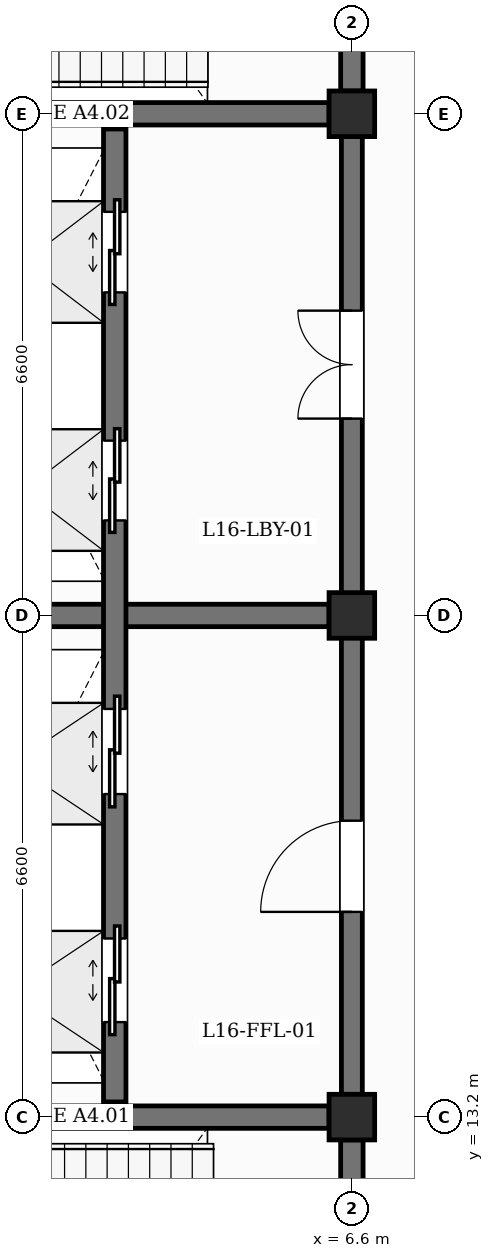
"""IFC4 building model, lengths in metres.
Left out: names, types, materials, properties, quantities, classifications, styles, units other than length and angle.
Written with IfcOpenShell. Run it as: python <this file> out.ifc"""

import sys

from ifc_helpers import new_model, si_unit, direction, frame, frame_2d, origin, origin_2d, place, context, subcontext, project, spatial, rectangle, extrude, element, fill, save


model = new_model("IFC4")
c1 = context("Model", 3, precision=1e-05, world=origin(), true_north=direction((0.0, 1.0)))
c2 = subcontext(c1, "Body", "Model", "MODEL_VIEW")
j1 = project(units=[si_unit("LENGTHUNIT", "METRE"), si_unit("PLANEANGLEUNIT", "RADIAN")], contexts=[c1])
p1 = place(None, origin())
s1 = spatial("IfcSite", under=j1, at=p1, CompositionType="ELEMENT")
p2 = place(p1, origin())
s2 = spatial("IfcBuilding", under=s1, at=p2, CompositionType="ELEMENT")
p3 = place(p2, frame((0.0, 0.0, 69.0)))
s3 = spatial("IfcBuildingStorey", under=s2, at=p3, CompositionType="ELEMENT", Elevation=69.0)
for number, where, z_axis, x_axis in (
    (1, (6.6, 13.2, 0.0), (0.0, 0.0, 1.0), (1.0, 0.0, 0.0)),
    (2, (6.6, 19.8, 0.0), (0.0, 0.0, 1.0), (1.0, 0.0, 0.0)),
    (3, (6.6, 26.4, 0.0), (0.0, 0.0, 1.0), (1.0, 0.0, 0.0)),
):
    element("IfcColumn", number, at=place(p3, frame(where, z_axis=z_axis, x_axis=x_axis)), inside=s3, PredefinedType="COLUMN", context=c2, shape_type="SweptSolid", body=[
        extrude(rectangle(XDim=0.6, YDim=0.6, at=origin_2d()), origin(), (0.0, 0.0, 1.0), 4.2),
    ])
p4 = place(p3, frame((0.3, 13.2, 0.0), z_axis=(0.0, 0.0, 1.0), x_axis=(1.0, 0.0, 0.0)))
e4 = element("IfcWall", 4, at=p4, inside=s3, PredefinedType="SHEAR", context=c2, shape_type="SweptSolid", body=[
    extrude(rectangle(XDim=6.0, YDim=0.295, at=frame_2d((3.0, 0.0))), origin(), (0.0, 0.0, 1.0), 3.56),
])
p5 = place(p3, frame((6.6, 6.9, 0.0), z_axis=(0.0, 0.0, 1.0), x_axis=(0.0, 1.0, 0.0)))
e5 = element("IfcWall", 5, at=p5, inside=s3, PredefinedType="SHEAR", context=c2, shape_type="SweptSolid", body=[
    extrude(rectangle(XDim=6.0, YDim=0.295, at=frame_2d((3.0, 0.0))), origin(), (0.0, 0.0, 1.0), 3.62),
])
p6 = place(p5, frame((2.425, 0.0, 0.0)))
e6 = element("IfcOpeningElement", 6, at=p6, cuts=e5, PredefinedType="OPENING", context=c2, shape_type="SweptSolid", body=[
    extrude(rectangle(XDim=1.15, YDim=2.2, at=frame_2d((0.575, 1.1))), frame((0.0, 0.157, 0.0), z_axis=(0.0, -1.0, 0.0), x_axis=(1.0, 0.0, 0.0)), (0.0, 0.0, 1.0), 0.315),
])
p7 = place(p3, frame((0.3, 26.4, 0.0), z_axis=(0.0, 0.0, 1.0), x_axis=(1.0, 0.0, 0.0)))
e7 = element("IfcWall", 7, at=p7, inside=s3, PredefinedType="SHEAR", context=c2, shape_type="SweptSolid", body=[
    extrude(rectangle(XDim=6.0, YDim=0.295, at=frame_2d((3.0, 0.0))), origin(), (0.0, 0.0, 1.0), 3.56),
])
p8 = place(p3, frame((6.6, 26.7, 0.0), z_axis=(0.0, 0.0, 1.0), x_axis=(0.0, 1.0, 0.0)))
e8 = element("IfcWall", 8, at=p8, inside=s3, PredefinedType="SHEAR", context=c2, shape_type="SweptSolid", body=[
    extrude(rectangle(XDim=6.0, YDim=0.295, at=frame_2d((3.0, 0.0))), origin(), (0.0, 0.0, 1.0), 3.62),
])
p9 = place(p8, frame((2.425, 0.0, 0.0)))
e9 = element("IfcOpeningElement", 9, at=p9, cuts=e8, PredefinedType="OPENING", context=c2, shape_type="SweptSolid", body=[
    extrude(rectangle(XDim=1.15, YDim=2.2, at=frame_2d((0.575, 1.1))), frame((0.0, 0.157, 0.0), z_axis=(0.0, -1.0, 0.0), x_axis=(1.0, 0.0, 0.0)), (0.0, 0.0, 1.0), 0.315),
])
p10 = place(p3, frame((0.3, 19.8, 0.0), z_axis=(0.0, 0.0, 1.0), x_axis=(1.0, 0.0, 0.0)))
e10 = element("IfcWall", 10, at=p10, inside=s3, PredefinedType="SHEAR", context=c2, shape_type="SweptSolid", body=[
    extrude(rectangle(XDim=6.0, YDim=0.295, at=frame_2d((3.0, 0.0))), origin(), (0.0, 0.0, 1.0), 3.56),
])
p11 = place(p3, frame((6.6, 13.5, 0.0), z_axis=(0.0, 0.0, 1.0), x_axis=(0.0, 1.0, 0.0)))
e11 = element("IfcWall", 11, at=p11, inside=s3, PredefinedType="SHEAR", context=c2, shape_type="SweptSolid", body=[
    extrude(rectangle(XDim=6.0, YDim=0.275, at=frame_2d((3.0, 0.0))), origin(), (0.0, 0.0, 1.0), 3.62),
])
p12 = place(p11, frame((2.4, 0.0, 0.0)))
e12 = element("IfcOpeningElement", 12, at=p12, cuts=e11, PredefinedType="OPENING", context=c2, shape_type="SweptSolid", body=[
    extrude(rectangle(XDim=1.2, YDim=2.25, at=frame_2d((0.6, 1.125))), frame((0.0, 0.147, 0.0), z_axis=(0.0, -1.0, 0.0), x_axis=(1.0, 0.0, 0.0)), (0.0, 0.0, 1.0), 0.295),
])
p13 = place(p3, frame((6.6, 20.1, 0.0), z_axis=(0.0, 0.0, 1.0), x_axis=(0.0, 1.0, 0.0)))
e13 = element("IfcWall", 13, at=p13, inside=s3, PredefinedType="SHEAR", context=c2, shape_type="SweptSolid", body=[
    extrude(rectangle(XDim=6.0, YDim=0.275, at=frame_2d((3.0, 0.0))), origin(), (0.0, 0.0, 1.0), 3.62),
])
p14 = place(p13, frame((2.29, 0.0, 0.0)))
e14 = element("IfcOpeningElement", 14, at=p14, cuts=e13, PredefinedType="OPENING", context=c2, shape_type="SweptSolid", body=[
    extrude(rectangle(XDim=1.42, YDim=2.2, at=frame_2d((0.71, 1.1))), frame((0.0, 0.147, 0.0), z_axis=(0.0, -1.0, 0.0), x_axis=(1.0, 0.0, 0.0)), (0.0, 0.0, 1.0), 0.295),
])
p15 = place(p3, frame((3.48, 13.4, 0.0), z_axis=(0.0, 0.0, 1.0), x_axis=(0.0, 1.0, 0.0)))
e15 = element("IfcWall", 15, at=p15, inside=s3, PredefinedType="SHEAR", context=c2, shape_type="SweptSolid", body=[
    extrude(rectangle(XDim=6.2, YDim=0.295, at=frame_2d((3.1, 0.0))), origin(), (0.0, 0.0, 1.0), 3.92),
])
p16 = place(p15, frame((1.05, 0.0, 0.0)))
e16 = element("IfcOpeningElement", 16, at=p16, cuts=e15, PredefinedType="OPENING", context=c2, shape_type="SweptSolid", body=[
    extrude(rectangle(XDim=1.1, YDim=2.15, at=frame_2d((0.55, 1.075))), frame((0.0, 0.157, 0.0), z_axis=(0.0, -1.0, 0.0), x_axis=(1.0, 0.0, 0.0)), (0.0, 0.0, 1.0), 0.315),
])
p17 = place(p15, frame((4.05, 0.0, 0.0)))
e17 = element("IfcOpeningElement", 17, at=p17, cuts=e15, PredefinedType="OPENING", context=c2, shape_type="SweptSolid", body=[
    extrude(rectangle(XDim=1.12, YDim=2.15, at=frame_2d((0.56, 1.075))), frame((0.0, 0.157, 0.0), z_axis=(0.0, -1.0, 0.0), x_axis=(1.0, 0.0, 0.0)), (0.0, 0.0, 1.0), 0.315),
])
p18 = place(p3, frame((3.48, 20.0, 0.0), z_axis=(0.0, 0.0, 1.0), x_axis=(0.0, 1.0, 0.0)))
e18 = element("IfcWall", 18, at=p18, inside=s3, PredefinedType="SHEAR", context=c2, shape_type="SweptSolid", body=[
    extrude(rectangle(XDim=6.2, YDim=0.295, at=frame_2d((3.1, 0.0))), origin(), (0.0, 0.0, 1.0), 3.92),
])
p19 = place(p18, frame((1.05, 0.0, 0.0)))
e19 = element("IfcOpeningElement", 19, at=p19, cuts=e18, PredefinedType="OPENING", context=c2, shape_type="SweptSolid", body=[
    extrude(rectangle(XDim=1.05, YDim=2.15, at=frame_2d((0.525, 1.075))), frame((0.0, 0.157, 0.0), z_axis=(0.0, -1.0, 0.0), x_axis=(1.0, 0.0, 0.0)), (0.0, 0.0, 1.0), 0.315),
])
p20 = place(p18, frame((4.05, 0.0, 0.0)))
e20 = element("IfcOpeningElement", 20, at=p20, cuts=e18, PredefinedType="OPENING", context=c2, shape_type="SweptSolid", body=[
    extrude(rectangle(XDim=1.06, YDim=2.15, at=frame_2d((0.53, 1.075))), frame((0.0, 0.157, 0.0), z_axis=(0.0, -1.0, 0.0), x_axis=(1.0, 0.0, 0.0)), (0.0, 0.0, 1.0), 0.315),
])
p21 = place(p16, origin())
e21 = element("IfcDoor", 21, at=p21, inside=s3, OperationType="DOUBLE_DOOR_SLIDING", PredefinedType="USERDEFINED", context=c2, shape_type="SweptSolid", body=[
    extrude(rectangle(XDim=1.1, YDim=2.15, at=frame_2d((0.55, 1.075))), frame((0.0, 0.025, 0.0), z_axis=(0.0, -1.0, 0.0), x_axis=(1.0, 0.0, 0.0)), (0.0, 0.0, 1.0), 0.05),
])
fill(e16, e21)
p22 = place(p17, origin())
e22 = element("IfcDoor", 22, at=p22, inside=s3, OperationType="DOUBLE_DOOR_SLIDING", PredefinedType="USERDEFINED", context=c2, shape_type="SweptSolid", body=[
    extrude(rectangle(XDim=1.12, YDim=2.15, at=frame_2d((0.56, 1.075))), frame((0.0, 0.025, 0.0), z_axis=(0.0, -1.0, 0.0), x_axis=(1.0, 0.0, 0.0)), (0.0, 0.0, 1.0), 0.05),
])
fill(e17, e22)
p23 = place(p19, origin())
e23 = element("IfcDoor", 23, at=p23, inside=s3, OperationType="DOUBLE_DOOR_SLIDING", PredefinedType="USERDEFINED", context=c2, shape_type="SweptSolid", body=[
    extrude(rectangle(XDim=1.05, YDim=2.15, at=frame_2d((0.525, 1.075))), frame((0.0, 0.025, 0.0), z_axis=(0.0, -1.0, 0.0), x_axis=(1.0, 0.0, 0.0)), (0.0, 0.0, 1.0), 0.05),
])
fill(e19, e23)
p24 = place(p20, origin())
e24 = element("IfcDoor", 24, at=p24, inside=s3, OperationType="DOUBLE_DOOR_SLIDING", PredefinedType="USERDEFINED", context=c2, shape_type="SweptSolid", body=[
    extrude(rectangle(XDim=1.06, YDim=2.15, at=frame_2d((0.53, 1.075))), frame((0.0, 0.025, 0.0), z_axis=(0.0, -1.0, 0.0), x_axis=(1.0, 0.0, 0.0)), (0.0, 0.0, 1.0), 0.05),
])
fill(e20, e24)
p25 = place(p12, origin())
e25 = element("IfcDoor", 25, at=p25, inside=s3, OperationType="SINGLE_SWING_LEFT", PredefinedType="DOOR", context=c2, shape_type="SweptSolid", body=[
    extrude(rectangle(XDim=1.2, YDim=2.25, at=frame_2d((0.6, 1.125))), frame((0.0, 0.025, 0.0), z_axis=(0.0, -1.0, 0.0), x_axis=(1.0, 0.0, 0.0)), (0.0, 0.0, 1.0), 0.05),
])
fill(e12, e25)
p26 = place(p14, origin())
e26 = element("IfcDoor", 26, at=p26, inside=s3, OperationType="DOUBLE_DOOR_SINGLE_SWING", PredefinedType="DOOR", context=c2, shape_type="SweptSolid", body=[
    extrude(rectangle(XDim=1.42, YDim=2.2, at=frame_2d((0.71, 1.1))), frame((0.0, 0.025, 0.0), z_axis=(0.0, -1.0, 0.0), x_axis=(1.0, 0.0, 0.0)), (0.0, 0.0, 1.0), 0.05),
])
fill(e14, e26)
save(model, sys.argv[1])
